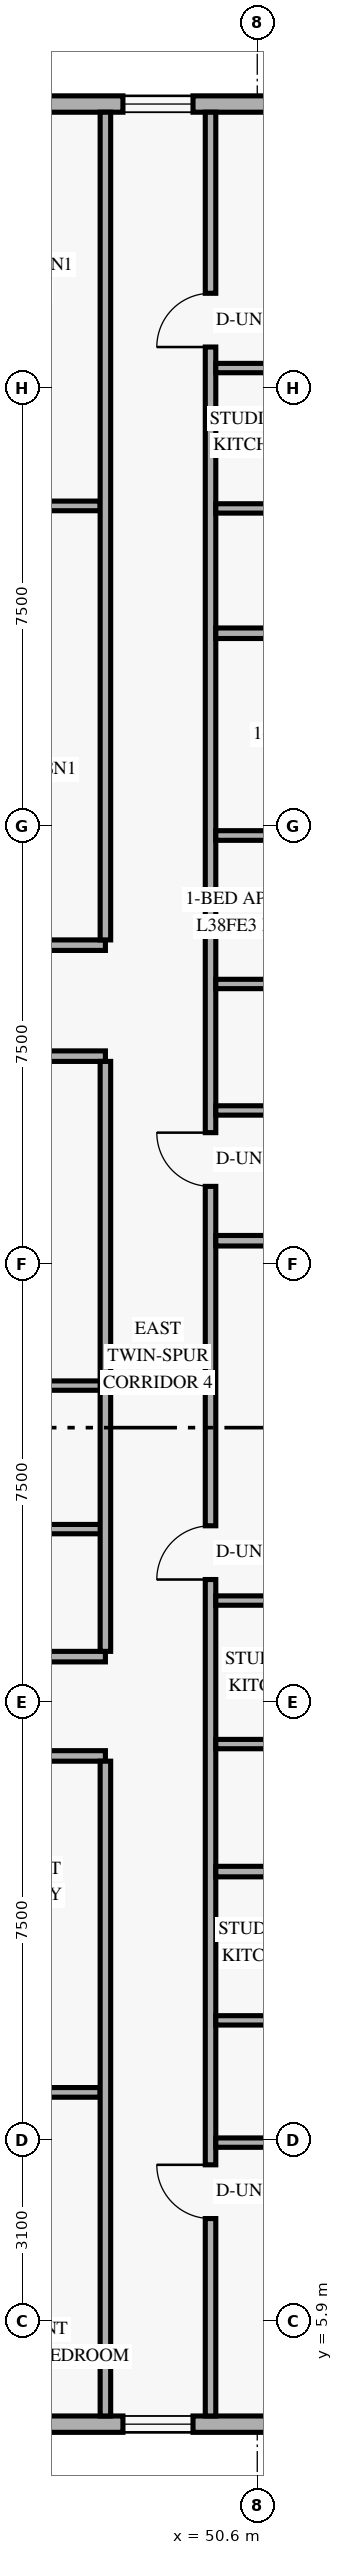
"""IFC4 building model, lengths in metres.
Left out: names, types, materials, properties, quantities, classifications, styles, units other than length and angle.
Written with IfcOpenShell. Run it as: python <this file> out.ifc"""

import sys

from ifc_helpers import new_model, si_unit, direction, frame, frame_2d, origin, place, context, subcontext, project, spatial, rectangle, extrude, element, fill, save


model = new_model("IFC4")
c1 = context("Model", 3, precision=1e-05, world=origin(), true_north=direction((0.0, 1.0)))
c2 = subcontext(c1, "Body", "Model", "MODEL_VIEW")
j1 = project(units=[si_unit("LENGTHUNIT", "METRE"), si_unit("PLANEANGLEUNIT", "RADIAN")], contexts=[c1])
p1 = place(None, origin())
s1 = spatial("IfcSite", under=j1, at=p1, CompositionType="ELEMENT")
p2 = place(p1, origin())
s2 = spatial("IfcBuilding", under=s1, at=p2, CompositionType="ELEMENT")
p3 = place(p2, frame((0.0, 0.0, 148.2)))
s3 = spatial("IfcBuildingStorey", under=s2, at=p3, CompositionType="ELEMENT", Elevation=148.2)
p4 = place(p3, frame((21.22, 4.14, 0.0), z_axis=(0.0, 0.0, 1.0), x_axis=(1.0, 0.0, 0.0)))
e1 = element("IfcWall", 1, at=p4, inside=s3, PredefinedType="SOLIDWALL", context=c2, shape_type="SweptSolid", body=[
    extrude(rectangle(XDim=33.76, YDim=0.28, at=frame_2d((16.88, 0.0))), origin(), (0.0, 0.0, 1.0), 3.36),
])
p5 = place(p4, frame((2.905, 0.0, 0.85)))
e2 = element("IfcOpeningElement", 2, at=p5, cuts=e1, PredefinedType="OPENING", context=c2, shape_type="SweptSolid", body=[
    extrude(rectangle(XDim=1.2, YDim=1.5, at=frame_2d((0.6, 0.75))), frame((0.0, 0.15, 0.0), z_axis=(0.0, -1.0, 0.0), x_axis=(1.0, 0.0, 0.0)), (0.0, 0.0, 1.0), 0.3),
])
p6 = place(p4, frame((9.79, 0.0, 0.85)))
e3 = element("IfcOpeningElement", 3, at=p6, cuts=e1, PredefinedType="OPENING", context=c2, shape_type="SweptSolid", body=[
    extrude(rectangle(XDim=1.2, YDim=1.5, at=frame_2d((0.6, 0.75))), frame((0.0, 0.15, 0.0), z_axis=(0.0, -1.0, 0.0), x_axis=(1.0, 0.0, 0.0)), (0.0, 0.0, 1.0), 0.3),
])
p7 = place(p4, frame((15.065, 0.0, 0.85)))
e4 = element("IfcOpeningElement", 4, at=p7, cuts=e1, PredefinedType="OPENING", context=c2, shape_type="SweptSolid", body=[
    extrude(rectangle(XDim=1.2, YDim=1.5, at=frame_2d((0.6, 0.75))), frame((0.0, 0.15, 0.0), z_axis=(0.0, -1.0, 0.0), x_axis=(1.0, 0.0, 0.0)), (0.0, 0.0, 1.0), 0.3),
])
p8 = place(p4, frame((19.625, 0.0, 0.85)))
e5 = element("IfcOpeningElement", 5, at=p8, cuts=e1, PredefinedType="OPENING", context=c2, shape_type="SweptSolid", body=[
    extrude(rectangle(XDim=1.2, YDim=1.5, at=frame_2d((0.6, 0.75))), frame((0.0, 0.15, 0.0), z_axis=(0.0, -1.0, 0.0), x_axis=(1.0, 0.0, 0.0)), (0.0, 0.0, 1.0), 0.3),
])
p9 = place(p4, frame((24.45, 0.0, 0.85)))
e6 = element("IfcOpeningElement", 6, at=p9, cuts=e1, PredefinedType="OPENING", context=c2, shape_type="SweptSolid", body=[
    extrude(rectangle(XDim=1.2, YDim=1.5, at=frame_2d((0.6, 0.75))), frame((0.0, 0.15, 0.0), z_axis=(0.0, -1.0, 0.0), x_axis=(1.0, 0.0, 0.0)), (0.0, 0.0, 1.0), 0.3),
])
p10 = place(p4, frame((27.08, 0.0, 0.85)))
e7 = element("IfcOpeningElement", 7, at=p10, cuts=e1, PredefinedType="OPENING", context=c2, shape_type="SweptSolid", body=[
    extrude(rectangle(XDim=1.2, YDim=1.5, at=frame_2d((0.6, 0.75))), frame((0.0, 0.15, 0.0), z_axis=(0.0, -1.0, 0.0), x_axis=(1.0, 0.0, 0.0)), (0.0, 0.0, 1.0), 0.3),
])
p11 = place(p4, frame((30.57, 0.0, 0.85)))
e8 = element("IfcOpeningElement", 8, at=p11, cuts=e1, PredefinedType="OPENING", context=c2, shape_type="SweptSolid", body=[
    extrude(rectangle(XDim=1.2, YDim=1.5, at=frame_2d((0.6, 0.75))), frame((0.0, 0.15, 0.0), z_axis=(0.0, -1.0, 0.0), x_axis=(1.0, 0.0, 0.0)), (0.0, 0.0, 1.0), 0.3),
])
p12 = place(p3, frame((54.98, 43.86, 0.0), z_axis=(0.0, 0.0, 1.0), x_axis=(-1.0, 0.0, 0.0)))
e9 = element("IfcWall", 9, at=p12, inside=s3, PredefinedType="SOLIDWALL", context=c2, shape_type="SweptSolid", body=[
    extrude(rectangle(XDim=33.76, YDim=0.28, at=frame_2d((16.88, 0.0))), origin(), (0.0, 0.0, 1.0), 3.36),
])
p13 = place(p12, frame((28.355, 0.0, 0.85)))
e10 = element("IfcOpeningElement", 10, at=p13, cuts=e9, PredefinedType="OPENING", context=c2, shape_type="SweptSolid", body=[
    extrude(rectangle(XDim=1.2, YDim=1.5, at=frame_2d((0.6, 0.75))), frame((0.0, 0.15, 0.0), z_axis=(0.0, -1.0, 0.0), x_axis=(1.0, 0.0, 0.0)), (0.0, 0.0, 1.0), 0.3),
])
p14 = place(p12, frame((21.47, 0.0, 0.85)))
e11 = element("IfcOpeningElement", 11, at=p14, cuts=e9, PredefinedType="OPENING", context=c2, shape_type="SweptSolid", body=[
    extrude(rectangle(XDim=1.2, YDim=1.5, at=frame_2d((0.6, 0.75))), frame((0.0, 0.15, 0.0), z_axis=(0.0, -1.0, 0.0), x_axis=(1.0, 0.0, 0.0)), (0.0, 0.0, 1.0), 0.3),
])
p15 = place(p12, frame((15.165, 0.0, 0.85)))
e12 = element("IfcOpeningElement", 12, at=p15, cuts=e9, PredefinedType="OPENING", context=c2, shape_type="SweptSolid", body=[
    extrude(rectangle(XDim=1.2, YDim=1.5, at=frame_2d((0.6, 0.75))), frame((0.0, 0.15, 0.0), z_axis=(0.0, -1.0, 0.0), x_axis=(1.0, 0.0, 0.0)), (0.0, 0.0, 1.0), 0.3),
])
p16 = place(p12, frame((8.875, 0.0, 0.85)))
e13 = element("IfcOpeningElement", 13, at=p16, cuts=e9, PredefinedType="OPENING", context=c2, shape_type="SweptSolid", body=[
    extrude(rectangle(XDim=1.2, YDim=1.5, at=frame_2d((0.6, 0.75))), frame((0.0, 0.15, 0.0), z_axis=(0.0, -1.0, 0.0), x_axis=(1.0, 0.0, 0.0)), (0.0, 0.0, 1.0), 0.3),
])
p17 = place(p12, frame((5.48, 0.0, 0.85)))
e14 = element("IfcOpeningElement", 14, at=p17, cuts=e9, PredefinedType="OPENING", context=c2, shape_type="SweptSolid", body=[
    extrude(rectangle(XDim=1.2, YDim=1.5, at=frame_2d((0.6, 0.75))), frame((0.0, 0.15, 0.0), z_axis=(0.0, -1.0, 0.0), x_axis=(1.0, 0.0, 0.0)), (0.0, 0.0, 1.0), 0.3),
])
p18 = place(p12, frame((1.99, 0.0, 0.85)))
e15 = element("IfcOpeningElement", 15, at=p18, cuts=e9, PredefinedType="OPENING", context=c2, shape_type="SweptSolid", body=[
    extrude(rectangle(XDim=1.2, YDim=1.5, at=frame_2d((0.6, 0.75))), frame((0.0, 0.15, 0.0), z_axis=(0.0, -1.0, 0.0), x_axis=(1.0, 0.0, 0.0)), (0.0, 0.0, 1.0), 0.3),
])
p19 = place(p3, frame((38.433, 15.58, 0.0), z_axis=(0.0, 0.0, 1.0), x_axis=(1.0, 0.0, 0.0)))
e16 = element("IfcWall", 16, at=p19, inside=s3, PredefinedType="STANDARD", context=c2, shape_type="SweptSolid", body=[
    extrude(rectangle(XDim=9.567, YDim=0.18, at=frame_2d((4.784, 0.0))), origin(), (0.0, 0.0, 1.0), 2.73),
])
p20 = place(p19, frame((0.327, 0.0, 0.0)))
e17 = element("IfcOpeningElement", 17, at=p20, cuts=e16, PredefinedType="OPENING", context=c2, shape_type="SweptSolid", body=[
    extrude(rectangle(XDim=0.92, YDim=2.15, at=frame_2d((0.46, 1.075))), frame((0.0, 0.1, 0.0), z_axis=(0.0, -1.0, 0.0), x_axis=(1.0, 0.0, 0.0)), (0.0, 0.0, 1.0), 0.2),
])
p21 = place(p3, frame((37.64, 17.28, 0.0), z_axis=(0.0, 0.0, 1.0), x_axis=(1.0, 0.0, 0.0)))
e18 = element("IfcWall", 18, at=p21, inside=s3, PredefinedType="STANDARD", context=c2, shape_type="SweptSolid", body=[
    extrude(rectangle(XDim=10.36, YDim=0.18, at=frame_2d((5.18, 0.0))), origin(), (0.0, 0.0, 1.0), 2.73),
])
p22 = place(p21, frame((5.625, 0.0, 0.0)))
e19 = element("IfcOpeningElement", 19, at=p22, cuts=e18, PredefinedType="OPENING", context=c2, shape_type="SweptSolid", body=[
    extrude(rectangle(XDim=0.92, YDim=2.15, at=frame_2d((0.46, 1.075))), frame((0.0, 0.1, 0.0), z_axis=(0.0, -1.0, 0.0), x_axis=(1.0, 0.0, 0.0)), (0.0, 0.0, 1.0), 0.2),
])
p23 = place(p3, frame((37.64, 27.56, 0.0), z_axis=(0.0, 0.0, 1.0), x_axis=(1.0, 0.0, 0.0)))
e20 = element("IfcWall", 20, at=p23, inside=s3, PredefinedType="STANDARD", context=c2, shape_type="SweptSolid", body=[
    extrude(rectangle(XDim=10.36, YDim=0.18, at=frame_2d((5.18, 0.0))), origin(), (0.0, 0.0, 1.0), 2.73),
])
p24 = place(p3, frame((35.51, 29.46, 0.0), z_axis=(0.0, 0.0, 1.0), x_axis=(1.0, 0.0, 0.0)))
e21 = element("IfcWall", 21, at=p24, inside=s3, PredefinedType="STANDARD", context=c2, shape_type="SweptSolid", body=[
    extrude(rectangle(XDim=12.49, YDim=0.18, at=frame_2d((6.245, 0.0))), origin(), (0.0, 0.0, 1.0), 2.73),
])
p25 = place(p24, frame((0.32, 0.0, 0.0)))
e22 = element("IfcOpeningElement", 22, at=p25, cuts=e21, PredefinedType="OPENING", context=c2, shape_type="SweptSolid", body=[
    extrude(rectangle(XDim=0.92, YDim=2.15, at=frame_2d((0.46, 1.075))), frame((0.0, 0.1, 0.0), z_axis=(0.0, -1.0, 0.0), x_axis=(1.0, 0.0, 0.0)), (0.0, 0.0, 1.0), 0.2),
])
p26 = place(p3, frame((44.62, 9.82, 0.0), z_axis=(0.0, 0.0, 1.0), x_axis=(1.0, 0.0, 0.0)))
e23 = element("IfcWall", 23, at=p26, inside=s3, PredefinedType="PARTITIONING", context=c2, shape_type="SweptSolid", body=[
    extrude(rectangle(XDim=3.29, YDim=0.165, at=frame_2d((1.645, 0.0))), origin(), (0.0, 0.0, 1.0), 2.73),
])
p27 = place(p3, frame((43.09, 36.98, 0.0), z_axis=(0.0, 0.0, 1.0), x_axis=(1.0, 0.0, 0.0)))
e24 = element("IfcWall", 24, at=p27, inside=s3, PredefinedType="PARTITIONING", context=c2, shape_type="SweptSolid", body=[
    extrude(rectangle(XDim=4.82, YDim=0.165, at=frame_2d((2.41, 0.0))), origin(), (0.0, 0.0, 1.0), 2.73),
])
p28 = place(p3, frame((45.38, 21.92, 0.0), z_axis=(0.0, 0.0, 1.0), x_axis=(1.0, 0.0, 0.0)))
e25 = element("IfcWall", 25, at=p28, inside=s3, PredefinedType="PLUMBINGWALL", context=c2, shape_type="SweptSolid", body=[
    extrude(rectangle(XDim=2.62, YDim=0.16, at=frame_2d((1.31, 0.0))), origin(), (0.0, 0.0, 1.0), 3.36),
])
p29 = place(p3, frame((45.54, 19.463, 0.0), z_axis=(0.0, 0.0, 1.0), x_axis=(1.0, 0.0, 0.0)))
e26 = element("IfcWall", 26, at=p29, inside=s3, PredefinedType="PLUMBINGWALL", context=c2, shape_type="SweptSolid", body=[
    extrude(rectangle(XDim=2.46, YDim=0.16, at=frame_2d((1.23, 0.0))), origin(), (0.0, 0.0, 1.0), 3.36),
])
p30 = place(p3, frame((49.8, 4.28, 0.0), z_axis=(0.0, 0.0, 1.0), x_axis=(0.0, 1.0, 0.0)))
e27 = element("IfcWall", 27, at=p30, inside=s3, PredefinedType="STANDARD", context=c2, shape_type="SweptSolid", body=[
    extrude(rectangle(XDim=39.44, YDim=0.18, at=frame_2d((19.72, 0.0))), origin(), (0.0, 0.0, 1.0), 2.73),
])
p31 = place(p30, frame((3.38, 0.0, 0.0)))
e28 = element("IfcOpeningElement", 28, at=p31, cuts=e27, PredefinedType="OPENING", context=c2, shape_type="SweptSolid", body=[
    extrude(rectangle(XDim=0.92, YDim=2.15, at=frame_2d((0.46, 1.075))), frame((0.0, 0.1, 0.0), z_axis=(0.0, -1.0, 0.0), x_axis=(1.0, 0.0, 0.0)), (0.0, 0.0, 1.0), 0.2),
])
p32 = place(p30, frame((14.32, 0.0, 0.0)))
e29 = element("IfcOpeningElement", 29, at=p32, cuts=e27, PredefinedType="OPENING", context=c2, shape_type="SweptSolid", body=[
    extrude(rectangle(XDim=0.92, YDim=2.15, at=frame_2d((0.46, 1.075))), frame((0.0, 0.1, 0.0), z_axis=(0.0, -1.0, 0.0), x_axis=(1.0, 0.0, 0.0)), (0.0, 0.0, 1.0), 0.2),
])
p33 = place(p30, frame((21.05, 0.0, 0.0)))
e30 = element("IfcOpeningElement", 30, at=p33, cuts=e27, PredefinedType="OPENING", context=c2, shape_type="SweptSolid", body=[
    extrude(rectangle(XDim=0.92, YDim=2.15, at=frame_2d((0.46, 1.075))), frame((0.0, 0.1, 0.0), z_axis=(0.0, -1.0, 0.0), x_axis=(1.0, 0.0, 0.0)), (0.0, 0.0, 1.0), 0.2),
])
p34 = place(p30, frame((35.42, 0.0, 0.0)))
e31 = element("IfcOpeningElement", 31, at=p34, cuts=e27, PredefinedType="OPENING", context=c2, shape_type="SweptSolid", body=[
    extrude(rectangle(XDim=0.92, YDim=2.15, at=frame_2d((0.46, 1.075))), frame((0.0, 0.1, 0.0), z_axis=(0.0, -1.0, 0.0), x_axis=(1.0, 0.0, 0.0)), (0.0, 0.0, 1.0), 0.2),
])
p35 = place(p3, frame((48.0, 4.28, 0.0), z_axis=(0.0, 0.0, 1.0), x_axis=(0.0, 1.0, 0.0)))
e32 = element("IfcWall", 32, at=p35, inside=s3, PredefinedType="STANDARD", context=c2, shape_type="SweptSolid", body=[
    extrude(rectangle(XDim=11.21, YDim=0.18, at=frame_2d((5.605, 0.0))), origin(), (0.0, 0.0, 1.0), 2.73),
])
p36 = place(p3, frame((48.0, 17.37, 0.0), z_axis=(0.0, 0.0, 1.0), x_axis=(0.0, 1.0, 0.0)))
e33 = element("IfcWall", 33, at=p36, inside=s3, PredefinedType="STANDARD", context=c2, shape_type="SweptSolid", body=[
    extrude(rectangle(XDim=10.1, YDim=0.18, at=frame_2d((5.05, 0.0))), origin(), (0.0, 0.0, 1.0), 2.73),
])
p37 = place(p3, frame((48.0, 29.55, 0.0), z_axis=(0.0, 0.0, 1.0), x_axis=(0.0, 1.0, 0.0)))
e34 = element("IfcWall", 34, at=p37, inside=s3, PredefinedType="STANDARD", context=c2, shape_type="SweptSolid", body=[
    extrude(rectangle(XDim=14.17, YDim=0.18, at=frame_2d((7.085, 0.0))), origin(), (0.0, 0.0, 1.0), 2.73),
])
p38 = place(p3, frame((49.89, 8.96, 0.0), z_axis=(0.0, 0.0, 1.0), x_axis=(1.0, 0.0, 0.0)))
e35 = element("IfcWall", 35, at=p38, inside=s3, PredefinedType="PLUMBINGWALL", context=c2, shape_type="SweptSolid", body=[
    extrude(rectangle(XDim=3.78, YDim=0.16, at=frame_2d((1.89, 0.0))), origin(), (0.0, 0.0, 1.0), 2.879),
])
p39 = place(p3, frame((49.89, 11.053, 0.0), z_axis=(0.0, 0.0, 1.0), x_axis=(1.0, 0.0, 0.0)))
e36 = element("IfcWall", 36, at=p39, inside=s3, PredefinedType="PLUMBINGWALL", context=c2, shape_type="SweptSolid", body=[
    extrude(rectangle(XDim=3.62, YDim=0.16, at=frame_2d((1.81, 0.0))), origin(), (0.0, 0.0, 1.0), 2.879),
])
p40 = place(p3, frame((49.89, 13.6, 0.0), z_axis=(0.0, 0.0, 1.0), x_axis=(1.0, 0.0, 0.0)))
e37 = element("IfcWall", 37, at=p40, inside=s3, PredefinedType="PARTITIONING", context=c2, shape_type="SweptSolid", body=[
    extrude(rectangle(XDim=8.43, YDim=0.18, at=frame_2d((4.215, 0.0))), origin(), (0.0, 0.0, 1.0), 2.879),
])
p41 = place(p3, frame((49.89, 18.24, 0.0), z_axis=(0.0, 0.0, 1.0), x_axis=(1.0, 0.0, 0.0)))
e38 = element("IfcWall", 38, at=p41, inside=s3, PredefinedType="PLUMBINGWALL", context=c2, shape_type="SweptSolid", body=[
    extrude(rectangle(XDim=3.78, YDim=0.16, at=frame_2d((1.89, 0.0))), origin(), (0.0, 0.0, 1.0), 2.879),
])
p42 = place(p3, frame((49.89, 15.783, 0.0), z_axis=(0.0, 0.0, 1.0), x_axis=(1.0, 0.0, 0.0)))
e39 = element("IfcWall", 39, at=p42, inside=s3, PredefinedType="PLUMBINGWALL", context=c2, shape_type="SweptSolid", body=[
    extrude(rectangle(XDim=3.62, YDim=0.16, at=frame_2d((1.81, 0.0))), origin(), (0.0, 0.0, 1.0), 2.879),
])
p43 = place(p3, frame((49.89, 24.4, 0.0), z_axis=(0.0, 0.0, 1.0), x_axis=(1.0, 0.0, 0.0)))
e40 = element("IfcWall", 40, at=p43, inside=s3, PredefinedType="PARTITIONING", context=c2, shape_type="SweptSolid", body=[
    extrude(rectangle(XDim=8.43, YDim=0.18, at=frame_2d((4.215, 0.0))), origin(), (0.0, 0.0, 1.0), 2.879),
])
p44 = place(p3, frame((49.89, 31.337, 0.0), z_axis=(0.0, 0.0, 1.0), x_axis=(1.0, 0.0, 0.0)))
e41 = element("IfcWall", 41, at=p44, inside=s3, PredefinedType="PARTITIONING", context=c2, shape_type="SweptSolid", body=[
    extrude(rectangle(XDim=8.43, YDim=0.165, at=frame_2d((4.215, 0.0))), origin(), (0.0, 0.0, 1.0), 2.879),
])
p45 = place(p44, frame((5.77, 0.0, 0.0)))
e42 = element("IfcOpeningElement", 42, at=p45, cuts=e41, PredefinedType="OPENING", context=c2, shape_type="SweptSolid", body=[
    extrude(rectangle(XDim=0.9, YDim=2.14, at=frame_2d((0.45, 1.07))), frame((0.0, 0.093, 0.0), z_axis=(0.0, -1.0, 0.0), x_axis=(1.0, 0.0, 0.0)), (0.0, 0.0, 1.0), 0.185),
])
p46 = place(p3, frame((49.89, 26.63, 0.0), z_axis=(0.0, 0.0, 1.0), x_axis=(1.0, 0.0, 0.0)))
e43 = element("IfcWall", 43, at=p46, inside=s3, PredefinedType="PLUMBINGWALL", context=c2, shape_type="SweptSolid", body=[
    extrude(rectangle(XDim=3.78, YDim=0.16, at=frame_2d((1.89, 0.0))), origin(), (0.0, 0.0, 1.0), 2.879),
])
p47 = place(p3, frame((49.89, 28.796, 0.0), z_axis=(0.0, 0.0, 1.0), x_axis=(1.0, 0.0, 0.0)))
e44 = element("IfcWall", 44, at=p47, inside=s3, PredefinedType="PLUMBINGWALL", context=c2, shape_type="SweptSolid", body=[
    extrude(rectangle(XDim=3.62, YDim=0.16, at=frame_2d((1.81, 0.0))), origin(), (0.0, 0.0, 1.0), 2.879),
])
p48 = place(p3, frame((49.89, 34.8, 0.0), z_axis=(0.0, 0.0, 1.0), x_axis=(1.0, 0.0, 0.0)))
e45 = element("IfcWall", 45, at=p48, inside=s3, PredefinedType="PARTITIONING", context=c2, shape_type="SweptSolid", body=[
    extrude(rectangle(XDim=8.43, YDim=0.18, at=frame_2d((4.215, 0.0))), origin(), (0.0, 0.0, 1.0), 2.879),
])
p49 = place(p3, frame((49.89, 39.34, 0.0), z_axis=(0.0, 0.0, 1.0), x_axis=(1.0, 0.0, 0.0)))
e46 = element("IfcWall", 46, at=p49, inside=s3, PredefinedType="PLUMBINGWALL", context=c2, shape_type="SweptSolid", body=[
    extrude(rectangle(XDim=3.78, YDim=0.16, at=frame_2d((1.89, 0.0))), origin(), (0.0, 0.0, 1.0), 2.879),
])
p50 = place(p3, frame((49.89, 36.937, 0.0), z_axis=(0.0, 0.0, 1.0), x_axis=(1.0, 0.0, 0.0)))
e47 = element("IfcWall", 47, at=p50, inside=s3, PredefinedType="PLUMBINGWALL", context=c2, shape_type="SweptSolid", body=[
    extrude(rectangle(XDim=3.62, YDim=0.16, at=frame_2d((1.81, 0.0))), origin(), (0.0, 0.0, 1.0), 2.879),
])
p51 = place(p10, origin())
e48 = element("IfcWindow", 48, at=p51, inside=s3, PartitioningType="SINGLE_PANEL", PredefinedType="WINDOW", context=c2, shape_type="SweptSolid", body=[
    extrude(rectangle(XDim=1.2, YDim=1.5, at=frame_2d((0.6, 0.75))), frame((0.0, 0.03, 0.0), z_axis=(0.0, -1.0, 0.0), x_axis=(1.0, 0.0, 0.0)), (0.0, 0.0, 1.0), 0.06),
])
fill(e7, e48)
p52 = place(p17, origin())
e49 = element("IfcWindow", 49, at=p52, inside=s3, PartitioningType="SINGLE_PANEL", PredefinedType="WINDOW", context=c2, shape_type="SweptSolid", body=[
    extrude(rectangle(XDim=1.2, YDim=1.5, at=frame_2d((0.6, 0.75))), frame((0.0, 0.03, 0.0), z_axis=(0.0, -1.0, 0.0), x_axis=(1.0, 0.0, 0.0)), (0.0, 0.0, 1.0), 0.06),
])
fill(e14, e49)
p53 = place(p31, origin())
e50 = element("IfcDoor", 50, at=p53, inside=s3, OperationType="SINGLE_SWING_RIGHT", PredefinedType="DOOR", context=c2, shape_type="SweptSolid", body=[
    extrude(rectangle(XDim=0.92, YDim=2.15, at=frame_2d((0.46, 1.075))), frame((0.0, 0.025, 0.0), z_axis=(0.0, -1.0, 0.0), x_axis=(1.0, 0.0, 0.0)), (0.0, 0.0, 1.0), 0.05),
])
fill(e28, e50)
p54 = place(p32, origin())
e51 = element("IfcDoor", 51, at=p54, inside=s3, OperationType="SINGLE_SWING_LEFT", PredefinedType="DOOR", context=c2, shape_type="SweptSolid", body=[
    extrude(rectangle(XDim=0.92, YDim=2.15, at=frame_2d((0.46, 1.075))), frame((0.0, 0.025, 0.0), z_axis=(0.0, -1.0, 0.0), x_axis=(1.0, 0.0, 0.0)), (0.0, 0.0, 1.0), 0.05),
])
fill(e29, e51)
p55 = place(p33, origin())
e52 = element("IfcDoor", 52, at=p55, inside=s3, OperationType="SINGLE_SWING_RIGHT", PredefinedType="DOOR", context=c2, shape_type="SweptSolid", body=[
    extrude(rectangle(XDim=0.92, YDim=2.15, at=frame_2d((0.46, 1.075))), frame((0.0, 0.025, 0.0), z_axis=(0.0, -1.0, 0.0), x_axis=(1.0, 0.0, 0.0)), (0.0, 0.0, 1.0), 0.05),
])
fill(e30, e52)
p56 = place(p34, origin())
e53 = element("IfcDoor", 53, at=p56, inside=s3, OperationType="SINGLE_SWING_LEFT", PredefinedType="DOOR", context=c2, shape_type="SweptSolid", body=[
    extrude(rectangle(XDim=0.92, YDim=2.15, at=frame_2d((0.46, 1.075))), frame((0.0, 0.025, 0.0), z_axis=(0.0, -1.0, 0.0), x_axis=(1.0, 0.0, 0.0)), (0.0, 0.0, 1.0), 0.05),
])
fill(e31, e53)
save(model, sys.argv[1])
